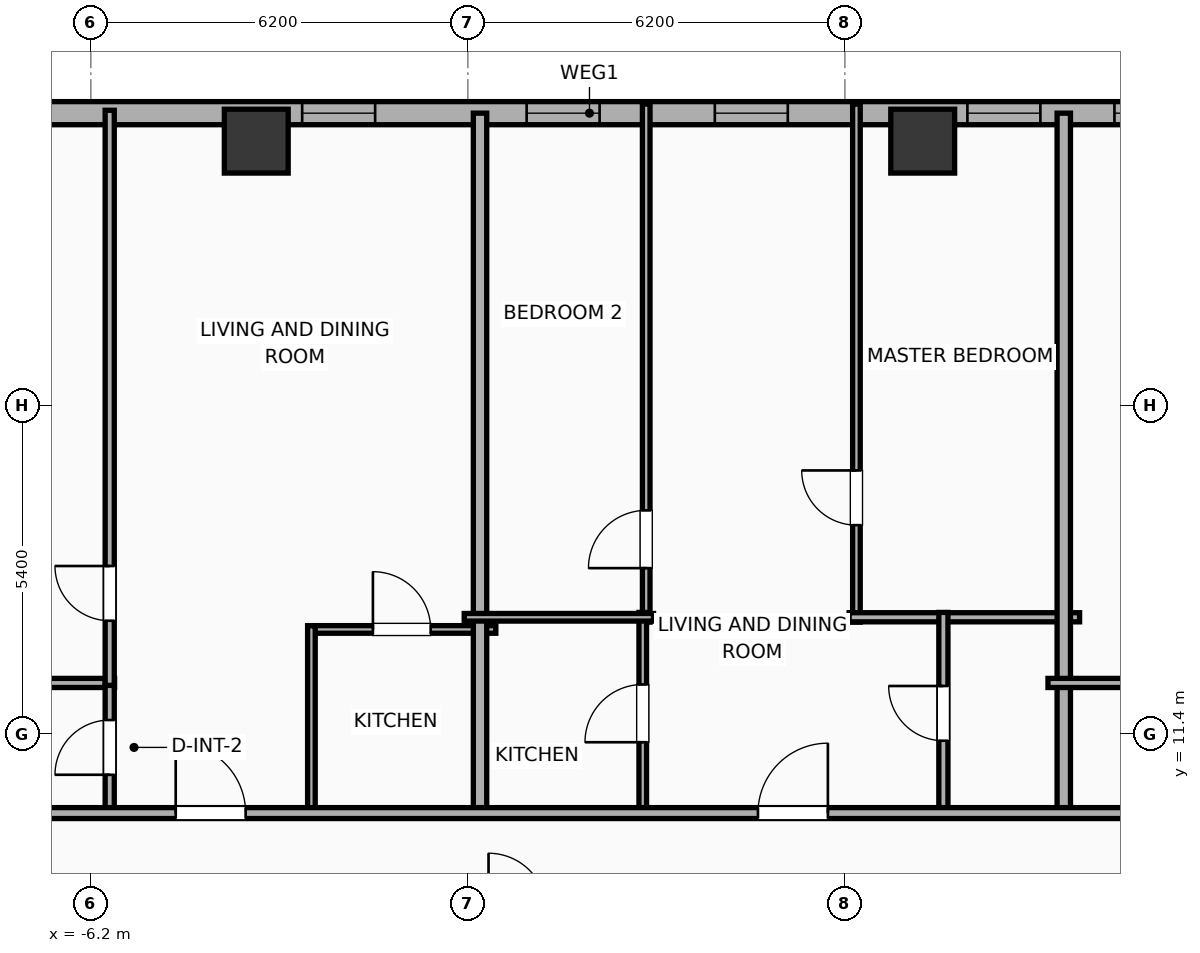
"""IFC4 building model, lengths in metres.
Left out: names, types, materials, properties, quantities, classifications, styles, units other than length and angle.
Written with IfcOpenShell. Run it as: python <this file> out.ifc"""

import sys

from ifc_helpers import new_model, si_unit, direction, frame, frame_2d, origin, origin_2d, place, context, subcontext, project, spatial, rectangle, hollow_rectangle, extrude, element, fill, save


model = new_model("IFC4")
c1 = context("Model", 3, precision=1e-05, world=origin(), true_north=direction((0.0, 1.0)))
c2 = subcontext(c1, "Body", "Model", "MODEL_VIEW")
j1 = project(units=[si_unit("LENGTHUNIT", "METRE"), si_unit("PLANEANGLEUNIT", "RADIAN")], contexts=[c1])
p1 = place(None, origin())
s1 = spatial("IfcSite", under=j1, at=p1, CompositionType="ELEMENT")
p2 = place(p1, origin())
s2 = spatial("IfcBuilding", under=s1, at=p2, CompositionType="ELEMENT")
p3 = place(p2, frame((0.0, 0.0, 105.3)))
s3 = spatial("IfcBuildingStorey", under=s2, at=p3, CompositionType="ELEMENT", Elevation=105.3)
for number, where, z_axis, x_axis in (
    (1, (7.48, 21.15, 0.0), (0.0, 0.0, 1.0), (1.0, 0.0, 0.0)),
    (2, (-3.48, 21.15, 0.0), (0.0, 0.0, 1.0), (1.0, 0.0, 0.0)),
):
    element("IfcColumn", number, at=place(p3, frame(where, z_axis=z_axis, x_axis=x_axis)), inside=s3, PredefinedType="COLUMN", context=c2, shape_type="SweptSolid", body=[
        extrude(hollow_rectangle(XDim=1.05, YDim=1.05, WallThickness=0.036, at=origin_2d()), origin(), (0.0, 0.0, 1.0), 3.9),
    ])
p4 = place(p3, frame((-25.381, 21.61, 0.0), z_axis=(0.0, 0.0, 1.0), x_axis=(1.0, 0.0, 0.0)))
e3 = element("IfcWall", 3, at=p4, inside=s3, PredefinedType="ELEMENTEDWALL", context=c2, shape_type="SweptSolid", body=[
    extrude(rectangle(XDim=54.763, YDim=0.38, at=frame_2d((27.381, 0.0))), origin(), (0.0, 0.0, 1.0), 3.65),
])
p5 = place(p4, frame((45.067, 0.0, 0.75)))
e4 = element("IfcOpeningElement", 4, at=p5, cuts=e3, PredefinedType="OPENING", context=c2, shape_type="SweptSolid", body=[
    extrude(rectangle(XDim=2.4, YDim=2.1, at=frame_2d((1.2, 1.05))), frame((0.0, 0.2, 0.0), z_axis=(0.0, -1.0, 0.0), x_axis=(1.0, 0.0, 0.0)), (0.0, 0.0, 1.0), 0.4),
])
p6 = place(p4, frame((4.076, 0.0, 0.75)))
e5 = element("IfcOpeningElement", 5, at=p6, cuts=e3, PredefinedType="OPENING", context=c2, shape_type="SweptSolid", body=[
    extrude(rectangle(XDim=1.2, YDim=2.05, at=frame_2d((0.6, 1.025))), frame((0.0, 0.2, 0.0), z_axis=(0.0, -1.0, 0.0), x_axis=(1.0, 0.0, 0.0)), (0.0, 0.0, 1.0), 0.4),
])
p7 = place(p4, frame((9.395, 0.0, 0.75)))
e6 = element("IfcOpeningElement", 6, at=p7, cuts=e3, PredefinedType="OPENING", context=c2, shape_type="SweptSolid", body=[
    extrude(rectangle(XDim=0.85, YDim=2.05, at=frame_2d((0.425, 1.025))), frame((0.0, 0.2, 0.0), z_axis=(0.0, -1.0, 0.0), x_axis=(1.0, 0.0, 0.0)), (0.0, 0.0, 1.0), 0.4),
])
p8 = place(p4, frame((7.205, 0.0, 0.75)))
e7 = element("IfcOpeningElement", 7, at=p8, cuts=e3, PredefinedType="OPENING", context=c2, shape_type="SweptSolid", body=[
    extrude(rectangle(XDim=1.2, YDim=2.05, at=frame_2d((0.6, 1.025))), frame((0.0, 0.2, 0.0), z_axis=(0.0, -1.0, 0.0), x_axis=(1.0, 0.0, 0.0)), (0.0, 0.0, 1.0), 0.4),
])
p9 = place(p4, frame((13.676, 0.0, 0.75)))
e8 = element("IfcOpeningElement", 8, at=p9, cuts=e3, PredefinedType="OPENING", context=c2, shape_type="SweptSolid", body=[
    extrude(rectangle(XDim=1.2, YDim=2.05, at=frame_2d((0.6, 1.025))), frame((0.0, 0.2, 0.0), z_axis=(0.0, -1.0, 0.0), x_axis=(1.0, 0.0, 0.0)), (0.0, 0.0, 1.0), 0.4),
])
p10 = place(p4, frame((17.136, 0.0, 0.75)))
e9 = element("IfcOpeningElement", 9, at=p10, cuts=e3, PredefinedType="OPENING", context=c2, shape_type="SweptSolid", body=[
    extrude(rectangle(XDim=1.2, YDim=2.05, at=frame_2d((0.6, 1.025))), frame((0.0, 0.2, 0.0), z_axis=(0.0, -1.0, 0.0), x_axis=(1.0, 0.0, 0.0)), (0.0, 0.0, 1.0), 0.4),
])
p11 = place(p4, frame((22.656, 0.0, 0.75)))
e10 = element("IfcOpeningElement", 10, at=p11, cuts=e3, PredefinedType="OPENING", context=c2, shape_type="SweptSolid", body=[
    extrude(rectangle(XDim=1.2, YDim=2.05, at=frame_2d((0.6, 1.025))), frame((0.0, 0.2, 0.0), z_axis=(0.0, -1.0, 0.0), x_axis=(1.0, 0.0, 0.0)), (0.0, 0.0, 1.0), 0.4),
])
p12 = place(p4, frame((29.443, 0.0, 0.75)))
e11 = element("IfcOpeningElement", 11, at=p12, cuts=e3, PredefinedType="OPENING", context=c2, shape_type="SweptSolid", body=[
    extrude(rectangle(XDim=1.2, YDim=2.05, at=frame_2d((0.6, 1.025))), frame((0.0, 0.2, 0.0), z_axis=(0.0, -1.0, 0.0), x_axis=(1.0, 0.0, 0.0)), (0.0, 0.0, 1.0), 0.4),
])
p13 = place(p4, frame((26.348, 0.0, 0.75)))
e12 = element("IfcOpeningElement", 12, at=p13, cuts=e3, PredefinedType="OPENING", context=c2, shape_type="SweptSolid", body=[
    extrude(rectangle(XDim=1.2, YDim=2.05, at=frame_2d((0.6, 1.025))), frame((0.0, 0.2, 0.0), z_axis=(0.0, -1.0, 0.0), x_axis=(1.0, 0.0, 0.0)), (0.0, 0.0, 1.0), 0.4),
])
p14 = place(p4, frame((33.596, 0.0, 0.75)))
e13 = element("IfcOpeningElement", 13, at=p14, cuts=e3, PredefinedType="OPENING", context=c2, shape_type="SweptSolid", body=[
    extrude(rectangle(XDim=1.2, YDim=2.05, at=frame_2d((0.6, 1.025))), frame((0.0, 0.2, 0.0), z_axis=(0.0, -1.0, 0.0), x_axis=(1.0, 0.0, 0.0)), (0.0, 0.0, 1.0), 0.4),
])
p15 = place(p4, frame((36.014, 0.0, 0.75)))
e14 = element("IfcOpeningElement", 14, at=p15, cuts=e3, PredefinedType="OPENING", context=c2, shape_type="SweptSolid", body=[
    extrude(rectangle(XDim=1.2, YDim=2.05, at=frame_2d((0.6, 1.025))), frame((0.0, 0.2, 0.0), z_axis=(0.0, -1.0, 0.0), x_axis=(1.0, 0.0, 0.0)), (0.0, 0.0, 1.0), 0.4),
])
p16 = place(p4, frame((40.814, 0.0, 0.75)))
e15 = element("IfcOpeningElement", 15, at=p16, cuts=e3, PredefinedType="OPENING", context=c2, shape_type="SweptSolid", body=[
    extrude(rectangle(XDim=1.2, YDim=2.05, at=frame_2d((0.6, 1.025))), frame((0.0, 0.2, 0.0), z_axis=(0.0, -1.0, 0.0), x_axis=(1.0, 0.0, 0.0)), (0.0, 0.0, 1.0), 0.4),
])
p17 = place(p4, frame((49.385, 0.0, 0.75)))
e16 = element("IfcOpeningElement", 16, at=p17, cuts=e3, PredefinedType="OPENING", context=c2, shape_type="SweptSolid", body=[
    extrude(rectangle(XDim=1.2, YDim=2.05, at=frame_2d((0.6, 1.025))), frame((0.0, 0.2, 0.0), z_axis=(0.0, -1.0, 0.0), x_axis=(1.0, 0.0, 0.0)), (0.0, 0.0, 1.0), 0.4),
])
p18 = place(p4, frame((52.181, 0.0, 0.75)))
e17 = element("IfcOpeningElement", 17, at=p18, cuts=e3, PredefinedType="OPENING", context=c2, shape_type="SweptSolid", body=[
    extrude(rectangle(XDim=1.2, YDim=2.05, at=frame_2d((0.6, 1.025))), frame((0.0, 0.2, 0.0), z_axis=(0.0, -1.0, 0.0), x_axis=(1.0, 0.0, 0.0)), (0.0, 0.0, 1.0), 0.4),
])
p19 = place(p3, frame((-9.66, 12.24, 0.0), z_axis=(0.0, 0.0, 1.0), x_axis=(1.0, 0.0, 0.0)))
e18 = element("IfcWall", 18, at=p19, inside=s3, PredefinedType="PLUMBINGWALL", context=c2, shape_type="SweptSolid", body=[
    extrude(rectangle(XDim=3.85, YDim=0.15, at=frame_2d((1.925, 0.0))), origin(), (0.0, 0.0, 1.0), 3.65),
])
p20 = place(p3, frame((-5.89, 10.08, 0.0), z_axis=(0.0, 0.0, 1.0), x_axis=(0.0, 1.0, 0.0)))
e19 = element("IfcWall", 19, at=p20, inside=s3, PredefinedType="PLUMBINGWALL", context=c2, shape_type="SweptSolid", body=[
    extrude(rectangle(XDim=2.2, YDim=0.15, at=frame_2d((1.1, 0.0))), origin(), (0.0, 0.0, 1.0), 3.65),
])
p21 = place(p20, frame((0.65, 0.0, 0.0)))
e20 = element("IfcOpeningElement", 20, at=p21, cuts=e19, PredefinedType="OPENING", context=c2, shape_type="SweptSolid", body=[
    extrude(rectangle(XDim=0.9, YDim=2.05, at=frame_2d((0.45, 1.025))), frame((0.0, 0.085, 0.0), z_axis=(0.0, -1.0, 0.0), x_axis=(1.0, 0.0, 0.0)), (0.0, 0.0, 1.0), 0.17),
])
p22 = place(p3, frame((-5.89, 12.2, 0.0), z_axis=(0.0, 0.0, 1.0), x_axis=(0.0, 1.0, 0.0)))
e21 = element("IfcWall", 21, at=p22, inside=s3, PredefinedType="PLUMBINGWALL", context=c2, shape_type="SweptSolid", body=[
    extrude(rectangle(XDim=9.458, YDim=0.15, at=frame_2d((4.729, 0.0))), origin(), (0.0, 0.0, 1.0), 3.65),
])
p23 = place(p22, frame((1.063, 0.0, 0.0)))
e22 = element("IfcOpeningElement", 22, at=p23, cuts=e21, PredefinedType="OPENING", context=c2, shape_type="SweptSolid", body=[
    extrude(rectangle(XDim=0.9, YDim=2.05, at=frame_2d((0.45, 1.025))), frame((0.0, 0.085, 0.0), z_axis=(0.0, -1.0, 0.0), x_axis=(1.0, 0.0, 0.0)), (0.0, 0.0, 1.0), 0.17),
])
p24 = place(p3, frame((-2.633, 13.12, 0.0), z_axis=(0.0, 0.0, 1.0), x_axis=(1.0, 0.0, 0.0)))
e23 = element("IfcWall", 23, at=p24, inside=s3, PredefinedType="PARTITIONING", context=c2, shape_type="SweptSolid", body=[
    extrude(rectangle(XDim=3.093, YDim=0.125, at=frame_2d((1.546, 0.0))), origin(), (0.0, 0.0, 1.0), 3.65),
])
p25 = place(p24, frame((1.072, 0.0, 0.0)))
e24 = element("IfcOpeningElement", 24, at=p25, cuts=e23, PredefinedType="OPENING", context=c2, shape_type="SweptSolid", body=[
    extrude(rectangle(XDim=0.95, YDim=2.05, at=frame_2d((0.475, 1.025))), frame((0.0, 0.073, 0.0), z_axis=(0.0, -1.0, 0.0), x_axis=(1.0, 0.0, 0.0)), (0.0, 0.0, 1.0), 0.145),
])
p26 = place(p3, frame((-2.573, 10.08, 0.0), z_axis=(0.0, 0.0, 1.0), x_axis=(0.0, 1.0, 0.0)))
e25 = element("IfcWall", 25, at=p26, inside=s3, PredefinedType="PARTITIONING", context=c2, shape_type="SweptSolid", body=[
    extrude(rectangle(XDim=3.1, YDim=0.125, at=frame_2d((1.55, 0.0))), origin(), (0.0, 0.0, 1.0), 3.65),
])
p27 = place(p3, frame((0.2, 10.02, 0.0), z_axis=(0.0, 0.0, 1.0), x_axis=(0.0, 1.0, 0.0)))
e26 = element("IfcWall", 26, at=p27, inside=s3, PredefinedType="PARTITIONING", context=c2, shape_type="SweptSolid", body=[
    extrude(rectangle(XDim=11.59, YDim=0.22, at=frame_2d((5.795, 0.0))), origin(), (0.0, 0.0, 1.0), 3.65),
])
p28 = place(p3, frame((2.933, 13.24, 0.0), z_axis=(0.0, 0.0, 1.0), x_axis=(0.0, 1.0, 0.0)))
e27 = element("IfcWall", 27, at=p28, inside=s3, PredefinedType="PARTITIONING", context=c2, shape_type="SweptSolid", body=[
    extrude(rectangle(XDim=8.52, YDim=0.125, at=frame_2d((4.26, 0.0))), origin(), (0.0, 0.0, 1.0), 3.65),
])
p29 = place(p28, frame((0.888, 0.0, 0.0)))
e28 = element("IfcOpeningElement", 28, at=p29, cuts=e27, PredefinedType="OPENING", context=c2, shape_type="SweptSolid", body=[
    extrude(rectangle(XDim=0.95, YDim=2.05, at=frame_2d((0.475, 1.025))), frame((0.0, 0.073, 0.0), z_axis=(0.0, -1.0, 0.0), x_axis=(1.0, 0.0, 0.0)), (0.0, 0.0, 1.0), 0.145),
])
p30 = place(p3, frame((6.39, 13.24, 0.0), z_axis=(0.0, 0.0, 1.0), x_axis=(0.0, 1.0, 0.0)))
e29 = element("IfcWall", 29, at=p30, inside=s3, PredefinedType="PARTITIONING", context=c2, shape_type="SweptSolid", body=[
    extrude(rectangle(XDim=8.52, YDim=0.125, at=frame_2d((4.26, 0.0))), origin(), (0.0, 0.0, 1.0), 3.04),
])
p31 = place(p30, frame((1.595, 0.0, 0.0)))
e30 = element("IfcOpeningElement", 30, at=p31, cuts=e29, PredefinedType="OPENING", context=c2, shape_type="SweptSolid", body=[
    extrude(rectangle(XDim=0.9, YDim=2.05, at=frame_2d((0.45, 1.025))), frame((0.0, 0.073, 0.0), z_axis=(0.0, -1.0, 0.0), x_axis=(1.0, 0.0, 0.0)), (0.0, 0.0, 1.0), 0.145),
])
p32 = place(p3, frame((6.27, 13.32, 0.0), z_axis=(0.0, 0.0, 1.0), x_axis=(1.0, 0.0, 0.0)))
e31 = element("IfcWall", 31, at=p32, inside=s3, PredefinedType="PLUMBINGWALL", context=c2, shape_type="SweptSolid", body=[
    extrude(rectangle(XDim=3.79, YDim=0.15, at=frame_2d((1.895, 0.0))), origin(), (0.0, 0.0, 1.0), 3.65),
])
p33 = place(p3, frame((2.876, 10.08, 0.0), z_axis=(0.0, 0.0, 1.0), x_axis=(0.0, 1.0, 0.0)))
e32 = element("IfcWall", 32, at=p33, inside=s3, PredefinedType="PARTITIONING", context=c2, shape_type="SweptSolid", body=[
    extrude(rectangle(XDim=3.32, YDim=0.125, at=frame_2d((1.66, 0.0))), origin(), (0.0, 0.0, 1.0), 3.65),
])
p34 = place(p33, frame((1.185, 0.0, 0.0)))
e33 = element("IfcOpeningElement", 33, at=p34, cuts=e32, PredefinedType="OPENING", context=c2, shape_type="SweptSolid", body=[
    extrude(rectangle(XDim=0.95, YDim=2.05, at=frame_2d((0.475, 1.025))), frame((0.0, 0.073, 0.0), z_axis=(0.0, -1.0, 0.0), x_axis=(1.0, 0.0, 0.0)), (0.0, 0.0, 1.0), 0.145),
])
p35 = place(p3, frame((-0.06, 13.32, 0.0), z_axis=(0.0, 0.0, 1.0), x_axis=(1.0, 0.0, 0.0)))
e34 = element("IfcWall", 34, at=p35, inside=s3, PredefinedType="PARTITIONING", context=c2, shape_type="SweptSolid", body=[
    extrude(rectangle(XDim=3.113, YDim=0.125, at=frame_2d((1.557, 0.0))), origin(), (0.0, 0.0, 1.0), 3.65),
])
p36 = place(p3, frame((7.82, 10.08, 0.0), z_axis=(0.0, 0.0, 1.0), x_axis=(0.0, 1.0, 0.0)))
e35 = element("IfcWall", 35, at=p36, inside=s3, PredefinedType="PLUMBINGWALL", context=c2, shape_type="SweptSolid", body=[
    extrude(rectangle(XDim=3.32, YDim=0.15, at=frame_2d((1.66, 0.0))), origin(), (0.0, 0.0, 1.0), 3.65),
])
p37 = place(p36, frame((1.21, 0.0, 0.0)))
e36 = element("IfcOpeningElement", 36, at=p37, cuts=e35, PredefinedType="OPENING", context=c2, shape_type="SweptSolid", body=[
    extrude(rectangle(XDim=0.9, YDim=2.05, at=frame_2d((0.45, 1.025))), frame((0.0, 0.085, 0.0), z_axis=(0.0, -1.0, 0.0), x_axis=(1.0, 0.0, 0.0)), (0.0, 0.0, 1.0), 0.17),
])
p38 = place(p3, frame((9.8, 10.02, 0.0), z_axis=(0.0, 0.0, 1.0), x_axis=(0.0, 1.0, 0.0)))
e37 = element("IfcWall", 37, at=p38, inside=s3, PredefinedType="PARTITIONING", context=c2, shape_type="SweptSolid", body=[
    extrude(rectangle(XDim=11.59, YDim=0.22, at=frame_2d((5.795, 0.0))), origin(), (0.0, 0.0, 1.0), 3.65),
])
p39 = place(p3, frame((9.54, 12.24, 0.0), z_axis=(0.0, 0.0, 1.0), x_axis=(1.0, 0.0, 0.0)))
e38 = element("IfcWall", 38, at=p39, inside=s3, PredefinedType="PLUMBINGWALL", context=c2, shape_type="SweptSolid", body=[
    extrude(rectangle(XDim=3.206, YDim=0.15, at=frame_2d((1.603, 0.0))), origin(), (0.0, 0.0, 1.0), 3.65),
])
p40 = place(p3, frame((-29.21, 10.1, 0.0), z_axis=(0.0, 0.0, 1.0), x_axis=(1.0, 0.0, 0.0)))
e39 = element("IfcWall", 39, at=p40, inside=s3, PredefinedType="PARTITIONING", context=c2, shape_type="SweptSolid", body=[
    extrude(rectangle(XDim=62.42, YDim=0.18, at=frame_2d((31.21, 0.0))), origin(), (0.0, 0.0, 1.0), 3.65),
])
p41 = place(p40, frame((4.906, 0.0, 0.0)))
e40 = element("IfcOpeningElement", 40, at=p41, cuts=e39, PredefinedType="OPENING", context=c2, shape_type="SweptSolid", body=[
    extrude(rectangle(XDim=1.15, YDim=2.05, at=frame_2d((0.575, 1.025))), frame((0.0, 0.1, 0.0), z_axis=(0.0, -1.0, 0.0), x_axis=(1.0, 0.0, 0.0)), (0.0, 0.0, 1.0), 0.2),
])
p42 = place(p40, frame((14.812, 0.0, 0.0)))
e41 = element("IfcOpeningElement", 41, at=p42, cuts=e39, PredefinedType="OPENING", context=c2, shape_type="SweptSolid", body=[
    extrude(rectangle(XDim=1.15, YDim=2.05, at=frame_2d((0.575, 1.025))), frame((0.0, 0.1, 0.0), z_axis=(0.0, -1.0, 0.0), x_axis=(1.0, 0.0, 0.0)), (0.0, 0.0, 1.0), 0.2),
])
p43 = place(p40, frame((24.406, 0.0, 0.0)))
e42 = element("IfcOpeningElement", 42, at=p43, cuts=e39, PredefinedType="OPENING", context=c2, shape_type="SweptSolid", body=[
    extrude(rectangle(XDim=1.15, YDim=2.05, at=frame_2d((0.575, 1.025))), frame((0.0, 0.1, 0.0), z_axis=(0.0, -1.0, 0.0), x_axis=(1.0, 0.0, 0.0)), (0.0, 0.0, 1.0), 0.2),
])
p44 = place(p40, frame((33.981, 0.0, 0.0)))
e43 = element("IfcOpeningElement", 43, at=p44, cuts=e39, PredefinedType="OPENING", context=c2, shape_type="SweptSolid", body=[
    extrude(rectangle(XDim=1.15, YDim=2.05, at=frame_2d((0.575, 1.025))), frame((0.0, 0.1, 0.0), z_axis=(0.0, -1.0, 0.0), x_axis=(1.0, 0.0, 0.0)), (0.0, 0.0, 1.0), 0.2),
])
p45 = place(p40, frame((43.138, 0.0, 0.0)))
e44 = element("IfcOpeningElement", 44, at=p45, cuts=e39, PredefinedType="OPENING", context=c2, shape_type="SweptSolid", body=[
    extrude(rectangle(XDim=1.15, YDim=2.05, at=frame_2d((0.575, 1.025))), frame((0.0, 0.1, 0.0), z_axis=(0.0, -1.0, 0.0), x_axis=(1.0, 0.0, 0.0)), (0.0, 0.0, 1.0), 0.2),
])
p46 = place(p40, frame((51.777, 0.0, 0.0)))
e45 = element("IfcOpeningElement", 45, at=p46, cuts=e39, PredefinedType="OPENING", context=c2, shape_type="SweptSolid", body=[
    extrude(rectangle(XDim=0.9, YDim=2.05, at=frame_2d((0.45, 1.025))), frame((0.0, 0.1, 0.0), z_axis=(0.0, -1.0, 0.0), x_axis=(1.0, 0.0, 0.0)), (0.0, 0.0, 1.0), 0.2),
])
p47 = place(p40, frame((58.718, 0.0, 0.0)))
e46 = element("IfcOpeningElement", 46, at=p47, cuts=e39, PredefinedType="OPENING", context=c2, shape_type="SweptSolid", body=[
    extrude(rectangle(XDim=0.9, YDim=2.05, at=frame_2d((0.45, 1.025))), frame((0.0, 0.1, 0.0), z_axis=(0.0, -1.0, 0.0), x_axis=(1.0, 0.0, 0.0)), (0.0, 0.0, 1.0), 0.2),
])
p48 = place(p11, origin())
e47 = element("IfcWindow", 47, at=p48, inside=s3, PartitioningType="SINGLE_PANEL", PredefinedType="WINDOW", context=c2, shape_type="SweptSolid", body=[
    extrude(rectangle(XDim=1.2, YDim=2.05, at=frame_2d((0.6, 1.025))), frame((0.0, 0.03, 0.0), z_axis=(0.0, -1.0, 0.0), x_axis=(1.0, 0.0, 0.0)), (0.0, 0.0, 1.0), 0.06),
])
fill(e10, e47)
p49 = place(p12, origin())
e48 = element("IfcWindow", 48, at=p49, inside=s3, PartitioningType="SINGLE_PANEL", PredefinedType="WINDOW", context=c2, shape_type="SweptSolid", body=[
    extrude(rectangle(XDim=1.2, YDim=2.05, at=frame_2d((0.6, 1.025))), frame((0.0, 0.03, 0.0), z_axis=(0.0, -1.0, 0.0), x_axis=(1.0, 0.0, 0.0)), (0.0, 0.0, 1.0), 0.06),
])
fill(e11, e48)
p50 = place(p13, origin())
e49 = element("IfcWindow", 49, at=p50, inside=s3, PartitioningType="SINGLE_PANEL", PredefinedType="WINDOW", context=c2, shape_type="SweptSolid", body=[
    extrude(rectangle(XDim=1.2, YDim=2.05, at=frame_2d((0.6, 1.025))), frame((0.0, 0.03, 0.0), z_axis=(0.0, -1.0, 0.0), x_axis=(1.0, 0.0, 0.0)), (0.0, 0.0, 1.0), 0.06),
])
fill(e12, e49)
p51 = place(p14, origin())
e50 = element("IfcWindow", 50, at=p51, inside=s3, PartitioningType="SINGLE_PANEL", PredefinedType="WINDOW", context=c2, shape_type="SweptSolid", body=[
    extrude(rectangle(XDim=1.2, YDim=2.05, at=frame_2d((0.6, 1.025))), frame((0.0, 0.03, 0.0), z_axis=(0.0, -1.0, 0.0), x_axis=(1.0, 0.0, 0.0)), (0.0, 0.0, 1.0), 0.06),
])
fill(e13, e50)
p52 = place(p15, origin())
e51 = element("IfcWindow", 51, at=p52, inside=s3, PartitioningType="SINGLE_PANEL", PredefinedType="WINDOW", context=c2, shape_type="SweptSolid", body=[
    extrude(rectangle(XDim=1.2, YDim=2.05, at=frame_2d((0.6, 1.025))), frame((0.0, 0.03, 0.0), z_axis=(0.0, -1.0, 0.0), x_axis=(1.0, 0.0, 0.0)), (0.0, 0.0, 1.0), 0.06),
])
fill(e14, e51)
p53 = place(p21, origin())
e52 = element("IfcDoor", 52, at=p53, inside=s3, OperationType="SINGLE_SWING_LEFT", PredefinedType="DOOR", context=c2, shape_type="SweptSolid", body=[
    extrude(rectangle(XDim=0.9, YDim=2.05, at=frame_2d((0.45, 1.025))), frame((0.0, 0.025, 0.0), z_axis=(0.0, -1.0, 0.0), x_axis=(1.0, 0.0, 0.0)), (0.0, 0.0, 1.0), 0.05),
])
fill(e20, e52)
p54 = place(p23, origin())
e53 = element("IfcDoor", 53, at=p54, inside=s3, OperationType="SINGLE_SWING_RIGHT", PredefinedType="DOOR", context=c2, shape_type="SweptSolid", body=[
    extrude(rectangle(XDim=0.9, YDim=2.05, at=frame_2d((0.45, 1.025))), frame((0.0, 0.025, 0.0), z_axis=(0.0, -1.0, 0.0), x_axis=(1.0, 0.0, 0.0)), (0.0, 0.0, 1.0), 0.05),
])
fill(e22, e53)
p55 = place(p25, origin())
e54 = element("IfcDoor", 54, at=p55, inside=s3, OperationType="SINGLE_SWING_LEFT", PredefinedType="DOOR", context=c2, shape_type="SweptSolid", body=[
    extrude(rectangle(XDim=0.95, YDim=2.05, at=frame_2d((0.475, 1.025))), frame((0.0, 0.025, 0.0), z_axis=(0.0, -1.0, 0.0), x_axis=(1.0, 0.0, 0.0)), (0.0, 0.0, 1.0), 0.05),
])
fill(e24, e54)
p56 = place(p29, origin())
e55 = element("IfcDoor", 55, at=p56, inside=s3, OperationType="SINGLE_SWING_LEFT", PredefinedType="DOOR", context=c2, shape_type="SweptSolid", body=[
    extrude(rectangle(XDim=0.95, YDim=2.05, at=frame_2d((0.475, 1.025))), frame((0.0, 0.025, 0.0), z_axis=(0.0, -1.0, 0.0), x_axis=(1.0, 0.0, 0.0)), (0.0, 0.0, 1.0), 0.05),
])
fill(e28, e55)
p57 = place(p31, origin())
e56 = element("IfcDoor", 56, at=p57, inside=s3, OperationType="SINGLE_SWING_RIGHT", PredefinedType="DOOR", context=c2, shape_type="SweptSolid", body=[
    extrude(rectangle(XDim=0.9, YDim=2.05, at=frame_2d((0.45, 1.025))), frame((0.0, 0.025, 0.0), z_axis=(0.0, -1.0, 0.0), x_axis=(1.0, 0.0, 0.0)), (0.0, 0.0, 1.0), 0.05),
])
fill(e30, e56)
p58 = place(p34, origin())
e57 = element("IfcDoor", 57, at=p58, inside=s3, OperationType="SINGLE_SWING_LEFT", PredefinedType="DOOR", context=c2, shape_type="SweptSolid", body=[
    extrude(rectangle(XDim=0.95, YDim=2.05, at=frame_2d((0.475, 1.025))), frame((0.0, 0.025, 0.0), z_axis=(0.0, -1.0, 0.0), x_axis=(1.0, 0.0, 0.0)), (0.0, 0.0, 1.0), 0.05),
])
fill(e33, e57)
p59 = place(p37, origin())
e58 = element("IfcDoor", 58, at=p59, inside=s3, OperationType="SINGLE_SWING_RIGHT", PredefinedType="DOOR", context=c2, shape_type="SweptSolid", body=[
    extrude(rectangle(XDim=0.9, YDim=2.05, at=frame_2d((0.45, 1.025))), frame((0.0, 0.025, 0.0), z_axis=(0.0, -1.0, 0.0), x_axis=(1.0, 0.0, 0.0)), (0.0, 0.0, 1.0), 0.05),
])
fill(e36, e58)
p60 = place(p43, origin())
e59 = element("IfcDoor", 59, at=p60, inside=s3, OperationType="SINGLE_SWING_LEFT", PredefinedType="DOOR", context=c2, shape_type="SweptSolid", body=[
    extrude(rectangle(XDim=1.15, YDim=2.05, at=frame_2d((0.575, 1.025))), frame((0.0, 0.025, 0.0), z_axis=(0.0, -1.0, 0.0), x_axis=(1.0, 0.0, 0.0)), (0.0, 0.0, 1.0), 0.05),
])
fill(e42, e59)
p61 = place(p44, origin())
e60 = element("IfcDoor", 60, at=p61, inside=s3, OperationType="SINGLE_SWING_RIGHT", PredefinedType="DOOR", context=c2, shape_type="SweptSolid", body=[
    extrude(rectangle(XDim=1.15, YDim=2.05, at=frame_2d((0.575, 1.025))), frame((0.0, 0.025, 0.0), z_axis=(0.0, -1.0, 0.0), x_axis=(1.0, 0.0, 0.0)), (0.0, 0.0, 1.0), 0.05),
])
fill(e43, e60)
save(model, sys.argv[1])
